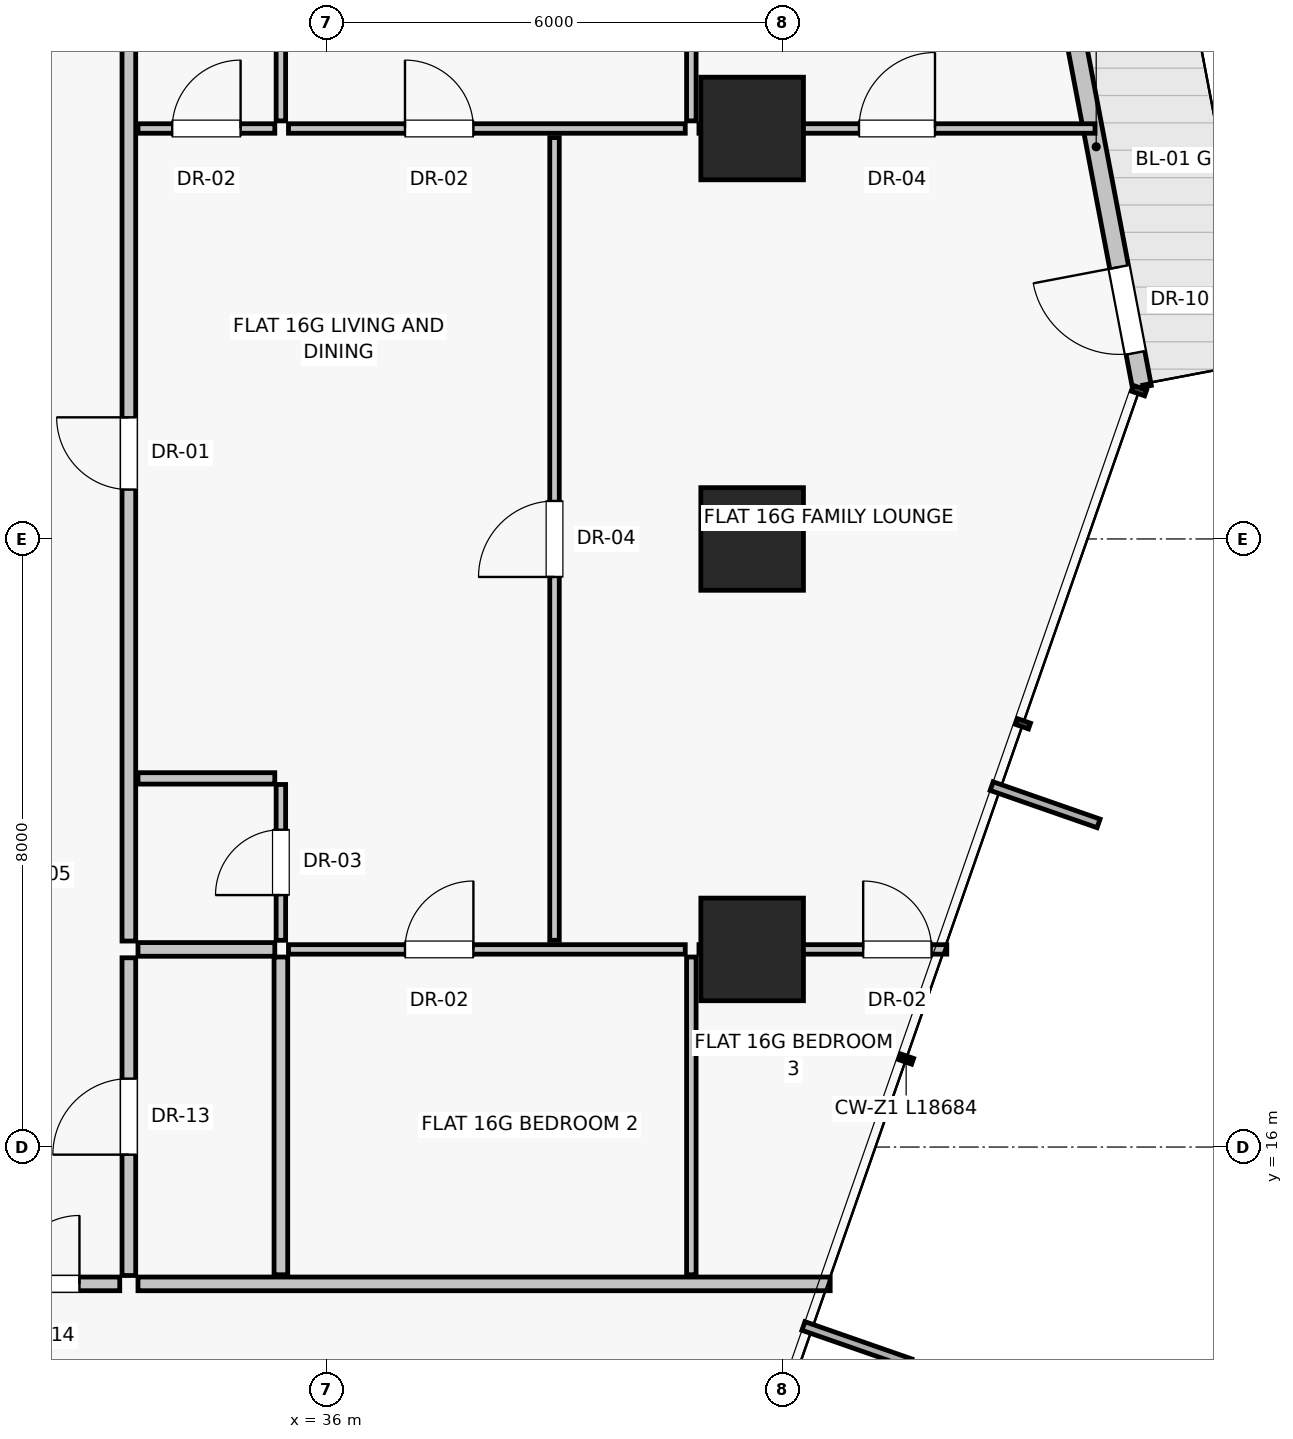
"""IFC4 building model, lengths in metres.
Left out: names, types, materials, properties, quantities, classifications, styles, units other than length and angle.
Written with IfcOpenShell. Run it as: python <this file> out.ifc"""

import sys

from ifc_helpers import new_model, si_unit, direction, frame, frame_2d, origin, origin_2d, place, context, subcontext, project, spatial, rectangle, extrude, source, transform, mapped, element, fill, save


model = new_model("IFC4")
c1 = context("Model", 3, precision=1e-05, world=origin(), true_north=direction((0.0, 1.0)))
c2 = subcontext(c1, "Body", "Model", "MODEL_VIEW")
j1 = project(units=[si_unit("LENGTHUNIT", "METRE"), si_unit("PLANEANGLEUNIT", "RADIAN")], contexts=[c1])
p1 = place(None, origin())
s1 = spatial("IfcSite", under=j1, at=p1, CompositionType="ELEMENT")
p2 = place(p1, origin())
s2 = spatial("IfcBuilding", under=s1, at=p2, CompositionType="ELEMENT")
p3 = place(p2, frame((0.0, 0.0, 60.85)))
s3 = spatial("IfcBuildingStorey", under=s2, at=p3, CompositionType="ELEMENT", Elevation=60.85)
for number, where, z_axis, x_axis in (
    (1, (41.6, 18.6, 0.0), (0.0, 0.0, 1.0), (1.0, 0.0, 0.0)),
    (2, (41.6, 24.0, 0.0), (0.0, 0.0, 1.0), (1.0, 0.0, 0.0)),
    (3, (41.6, 29.4, 0.0), (0.0, 0.0, 1.0), (1.0, 0.0, 0.0)),
):
    element("IfcColumn", number, at=place(p3, frame(where, z_axis=z_axis, x_axis=x_axis)), inside=s3, PredefinedType="COLUMN", context=c2, shape_type="SweptSolid", body=[
        extrude(rectangle(XDim=1.35, YDim=1.35, at=origin_2d()), origin(), (0.0, 0.0, 1.0), 3.25),
    ])
p4 = place(p3, frame((46.729, 25.996, 0.0), z_axis=(0.0, 0.0, 1.0), x_axis=(-0.187045972391, 0.982351161353, 0.0)))
e4 = element("IfcWall", 4, at=p4, inside=s3, PredefinedType="SOLIDWALL", context=c2, shape_type="SweptSolid", body=[
    extrude(rectangle(XDim=4.58, YDim=0.25, at=frame_2d((2.29, 0.0))), origin(), (0.0, 0.0, 1.0), 3.0),
])
p5 = place(p4, frame((0.46, 0.0, 0.0)))
e5 = element("IfcOpeningElement", 5, at=p5, cuts=e4, PredefinedType="OPENING", context=c2, shape_type="SweptSolid", body=[
    extrude(rectangle(XDim=1.15, YDim=2.25, at=frame_2d((0.575, 1.125))), frame((0.0, 0.135, 0.0), z_axis=(0.0, -1.0, 0.0), x_axis=(1.0, 0.0, 0.0)), (0.0, 0.0, 1.0), 0.27),
])
p6 = place(p3, frame((33.52, 14.2, 0.0), z_axis=(0.0, 0.0, 1.0), x_axis=(1.0, 0.0, 0.0)))
e6 = element("IfcWall", 6, at=p6, inside=s3, PredefinedType="PARTITIONING", context=c2, shape_type="SweptSolid", body=[
    extrude(rectangle(XDim=9.107, YDim=0.18, at=frame_2d((4.553, 0.0))), origin(), (0.0, 0.0, 1.0), 3.0),
])
p7 = place(p3, frame((33.4, 14.31, 0.0), z_axis=(0.0, 0.0, 1.0), x_axis=(0.0, 1.0, 0.0)))
e7 = element("IfcWall", 7, at=p7, inside=s3, PredefinedType="PARTITIONING", context=c2, shape_type="SweptSolid", body=[
    extrude(rectangle(XDim=4.18, YDim=0.18, at=frame_2d((2.09, 0.0))), origin(), (0.0, 0.0, 1.0), 3.0),
])
p8 = place(p7, frame((1.59, 0.0, 0.0)))
e8 = element("IfcOpeningElement", 8, at=p8, cuts=e7, PredefinedType="OPENING", context=c2, shape_type="SweptSolid", body=[
    extrude(rectangle(XDim=1.0, YDim=2.01, at=frame_2d((0.5, 1.005))), frame((0.0, 0.1, 0.0), z_axis=(0.0, -1.0, 0.0), x_axis=(1.0, 0.0, 0.0)), (0.0, 0.0, 1.0), 0.2),
])
p9 = place(p3, frame((33.4, 18.71, 0.0), z_axis=(0.0, 0.0, 1.0), x_axis=(0.0, 1.0, 0.0)))
e9 = element("IfcWall", 9, at=p9, inside=s3, PredefinedType="PARTITIONING", context=c2, shape_type="SweptSolid", body=[
    extrude(rectangle(XDim=14.78, YDim=0.18, at=frame_2d((7.39, 0.0))), origin(), (0.0, 0.0, 1.0), 3.0),
])
p10 = place(p9, frame((5.94, 0.0, 0.0)))
e10 = element("IfcOpeningElement", 10, at=p10, cuts=e9, PredefinedType="OPENING", context=c2, shape_type="SweptSolid", body=[
    extrude(rectangle(XDim=0.95, YDim=2.02, at=frame_2d((0.475, 1.01))), frame((0.0, 0.1, 0.0), z_axis=(0.0, -1.0, 0.0), x_axis=(1.0, 0.0, 0.0)), (0.0, 0.0, 1.0), 0.2),
])
p11 = place(p3, frame((40.8, 14.32, 0.0), z_axis=(0.0, 0.0, 1.0), x_axis=(0.0, 1.0, 0.0)))
e11 = element("IfcWall", 11, at=p11, inside=s3, PredefinedType="PARTITIONING", context=c2, shape_type="SweptSolid", body=[
    extrude(rectangle(XDim=4.18, YDim=0.125, at=frame_2d((2.09, 0.0))), origin(), (0.0, 0.0, 1.0), 3.0),
])
p12 = place(p3, frame((40.9, 18.6, 0.0), z_axis=(0.0, 0.0, 1.0), x_axis=(1.0, 0.0, 0.0)))
e12 = element("IfcWall", 12, at=p12, inside=s3, PredefinedType="PARTITIONING", context=c2, shape_type="SweptSolid", body=[
    extrude(rectangle(XDim=3.261, YDim=0.125, at=frame_2d((1.63, 0.0))), origin(), (0.0, 0.0, 1.0), 2.299),
])
p13 = place(p12, frame((2.161, 0.0, 0.0)))
e13 = element("IfcOpeningElement", 13, at=p13, cuts=e12, PredefinedType="OPENING", context=c2, shape_type="SweptSolid", body=[
    extrude(rectangle(XDim=0.9, YDim=2.01, at=frame_2d((0.45, 1.005))), frame((0.0, 0.073, 0.0), z_axis=(0.0, -1.0, 0.0), x_axis=(1.0, 0.0, 0.0)), (0.0, 0.0, 1.0), 0.145),
])
p14 = place(p3, frame((40.8, 29.5, 0.0), z_axis=(0.0, 0.0, 1.0), x_axis=(0.0, 1.0, 0.0)))
e14 = element("IfcWall", 14, at=p14, inside=s3, PredefinedType="PARTITIONING", context=c2, shape_type="SweptSolid", body=[
    extrude(rectangle(XDim=3.98, YDim=0.125, at=frame_2d((1.99, 0.0))), origin(), (0.0, 0.0, 1.0), 3.0),
])
p15 = place(p3, frame((40.9, 29.4, 0.0), z_axis=(0.0, 0.0, 1.0), x_axis=(1.0, 0.0, 0.0)))
e15 = element("IfcWall", 15, at=p15, inside=s3, PredefinedType="PARTITIONING", context=c2, shape_type="SweptSolid", body=[
    extrude(rectangle(XDim=5.211, YDim=0.125, at=frame_2d((2.605, 0.0))), origin(), (0.0, 0.0, 1.0), 2.299),
])
p16 = place(p15, frame((2.106, 0.0, 0.0)))
e16 = element("IfcOpeningElement", 16, at=p16, cuts=e15, PredefinedType="OPENING", context=c2, shape_type="SweptSolid", body=[
    extrude(rectangle(XDim=1.0, YDim=2.01, at=frame_2d((0.5, 1.005))), frame((0.0, 0.073, 0.0), z_axis=(0.0, -1.0, 0.0), x_axis=(1.0, 0.0, 0.0)), (0.0, 0.0, 1.0), 0.145),
])
p17 = place(p3, frame((39.0, 18.72, 0.0), z_axis=(0.0, 0.0, 1.0), x_axis=(0.0, 1.0, 0.0)))
e17 = element("IfcWall", 17, at=p17, inside=s3, PredefinedType="PARTITIONING", context=c2, shape_type="SweptSolid", body=[
    extrude(rectangle(XDim=10.56, YDim=0.125, at=frame_2d((5.28, 0.0))), origin(), (0.0, 0.0, 1.0), 3.0),
])
p18 = place(p17, frame((4.78, 0.0, 0.0)))
e18 = element("IfcOpeningElement", 18, at=p18, cuts=e17, PredefinedType="OPENING", context=c2, shape_type="SweptSolid", body=[
    extrude(rectangle(XDim=1.0, YDim=2.01, at=frame_2d((0.5, 1.005))), frame((0.0, 0.073, 0.0), z_axis=(0.0, -1.0, 0.0), x_axis=(1.0, 0.0, 0.0)), (0.0, 0.0, 1.0), 0.145),
])
p19 = place(p3, frame((35.4, 14.32, 0.0), z_axis=(0.0, 0.0, 1.0), x_axis=(0.0, 1.0, 0.0)))
e19 = element("IfcWall", 19, at=p19, inside=s3, PredefinedType="PARTITIONING", context=c2, shape_type="SweptSolid", body=[
    extrude(rectangle(XDim=4.18, YDim=0.18, at=frame_2d((2.09, 0.0))), origin(), (0.0, 0.0, 1.0), 3.0),
])
p20 = place(p3, frame((33.52, 18.6, 0.0), z_axis=(0.0, 0.0, 1.0), x_axis=(1.0, 0.0, 0.0)))
e20 = element("IfcWall", 20, at=p20, inside=s3, PredefinedType="PARTITIONING", context=c2, shape_type="SweptSolid", body=[
    extrude(rectangle(XDim=1.8, YDim=0.18, at=frame_2d((0.9, 0.0))), origin(), (0.0, 0.0, 1.0), 3.0),
])
p21 = place(p3, frame((35.5, 18.6, 0.0), z_axis=(0.0, 0.0, 1.0), x_axis=(1.0, 0.0, 0.0)))
e21 = element("IfcWall", 21, at=p21, inside=s3, PredefinedType="PARTITIONING", context=c2, shape_type="SweptSolid", body=[
    extrude(rectangle(XDim=5.22, YDim=0.125, at=frame_2d((2.61, 0.0))), origin(), (0.0, 0.0, 1.0), 2.299),
])
p22 = place(p21, frame((1.533, 0.0, 0.0)))
e22 = element("IfcOpeningElement", 22, at=p22, cuts=e21, PredefinedType="OPENING", context=c2, shape_type="SweptSolid", body=[
    extrude(rectangle(XDim=0.9, YDim=2.01, at=frame_2d((0.45, 1.005))), frame((0.0, 0.073, 0.0), z_axis=(0.0, -1.0, 0.0), x_axis=(1.0, 0.0, 0.0)), (0.0, 0.0, 1.0), 0.145),
])
p23 = place(p3, frame((33.52, 20.85, 0.0), z_axis=(0.0, 0.0, 1.0), x_axis=(1.0, 0.0, 0.0)))
e23 = element("IfcWall", 23, at=p23, inside=s3, PredefinedType="PARTITIONING", context=c2, shape_type="SweptSolid", body=[
    extrude(rectangle(XDim=1.8, YDim=0.15, at=frame_2d((0.9, 0.0))), origin(), (0.0, 0.0, 1.0), 3.0),
])
p24 = place(p3, frame((35.4, 18.72, 0.0), z_axis=(0.0, 0.0, 1.0), x_axis=(0.0, 1.0, 0.0)))
e24 = element("IfcWall", 24, at=p24, inside=s3, PredefinedType="PARTITIONING", context=c2, shape_type="SweptSolid", body=[
    extrude(rectangle(XDim=2.05, YDim=0.125, at=frame_2d((1.025, 0.0))), origin(), (0.0, 0.0, 1.0), 3.0),
])
p25 = place(p24, frame((0.595, 0.0, 0.0)))
e25 = element("IfcOpeningElement", 25, at=p25, cuts=e24, PredefinedType="OPENING", context=c2, shape_type="SweptSolid", body=[
    extrude(rectangle(XDim=0.86, YDim=2.01, at=frame_2d((0.43, 1.005))), frame((0.0, 0.073, 0.0), z_axis=(0.0, -1.0, 0.0), x_axis=(1.0, 0.0, 0.0)), (0.0, 0.0, 1.0), 0.145),
])
p26 = place(p3, frame((33.52, 29.4, 0.0), z_axis=(0.0, 0.0, 1.0), x_axis=(1.0, 0.0, 0.0)))
e26 = element("IfcWall", 26, at=p26, inside=s3, PredefinedType="PARTITIONING", context=c2, shape_type="SweptSolid", body=[
    extrude(rectangle(XDim=1.8, YDim=0.125, at=frame_2d((0.9, 0.0))), origin(), (0.0, 0.0, 1.0), 3.0),
])
p27 = place(p26, frame((0.45, 0.0, 0.0)))
e27 = element("IfcOpeningElement", 27, at=p27, cuts=e26, PredefinedType="OPENING", context=c2, shape_type="SweptSolid", body=[
    extrude(rectangle(XDim=0.9, YDim=2.01, at=frame_2d((0.45, 1.005))), frame((0.0, 0.073, 0.0), z_axis=(0.0, -1.0, 0.0), x_axis=(1.0, 0.0, 0.0)), (0.0, 0.0, 1.0), 0.145),
])
p28 = place(p3, frame((35.4, 29.5, 0.0), z_axis=(0.0, 0.0, 1.0), x_axis=(0.0, 1.0, 0.0)))
e28 = element("IfcWall", 28, at=p28, inside=s3, PredefinedType="PARTITIONING", context=c2, shape_type="SweptSolid", body=[
    extrude(rectangle(XDim=3.98, YDim=0.125, at=frame_2d((1.99, 0.0))), origin(), (0.0, 0.0, 1.0), 3.0),
])
p29 = place(p3, frame((35.5, 29.4, 0.0), z_axis=(0.0, 0.0, 1.0), x_axis=(1.0, 0.0, 0.0)))
e29 = element("IfcWall", 29, at=p29, inside=s3, PredefinedType="PARTITIONING", context=c2, shape_type="SweptSolid", body=[
    extrude(rectangle(XDim=5.22, YDim=0.125, at=frame_2d((2.61, 0.0))), origin(), (0.0, 0.0, 1.0), 2.299),
])
p30 = place(p29, frame((1.533, 0.0, 0.0)))
e30 = element("IfcOpeningElement", 30, at=p30, cuts=e29, PredefinedType="OPENING", context=c2, shape_type="SweptSolid", body=[
    extrude(rectangle(XDim=0.9, YDim=2.01, at=frame_2d((0.45, 1.005))), frame((0.0, 0.073, 0.0), z_axis=(0.0, -1.0, 0.0), x_axis=(1.0, 0.0, 0.0)), (0.0, 0.0, 1.0), 0.145),
])
p31 = place(p3, frame((31.32, 14.2, 0.0), z_axis=(0.0, 0.0, 1.0), x_axis=(1.0, 0.0, 0.0)))
e31 = element("IfcWall", 31, at=p31, inside=s3, PredefinedType="PARTITIONING", context=c2, shape_type="SweptSolid", body=[
    extrude(rectangle(XDim=1.96, YDim=0.18, at=frame_2d((0.98, 0.0))), origin(), (0.0, 0.0, 1.0), 3.0),
])
p32 = place(p31, frame((0.53, 0.0, 0.0)))
e32 = element("IfcOpeningElement", 32, at=p32, cuts=e31, PredefinedType="OPENING", context=c2, shape_type="SweptSolid", body=[
    extrude(rectangle(XDim=0.9, YDim=2.01, at=frame_2d((0.45, 1.005))), frame((0.0, 0.1, 0.0), z_axis=(0.0, -1.0, 0.0), x_axis=(1.0, 0.0, 0.0)), (0.0, 0.0, 1.0), 0.2),
])
m1 = source(origin(), c2, "Body", "SweptSolid", [
    extrude(rectangle(XDim=1.15, YDim=2.25, at=frame_2d((0.575, 1.125))), frame((0.0, 0.025, 0.0), z_axis=(0.0, -1.0, 0.0), x_axis=(1.0, 0.0, 0.0)), (0.0, 0.0, 1.0), 0.05),
])
p33 = place(p5, frame((1.15, 0.0, 0.0), z_axis=(0.0, 0.0, 1.0), x_axis=(-1.0, 0.0, 0.0)))
e33 = element("IfcDoor", 33, at=p33, inside=s3, OperationType="SINGLE_SWING_RIGHT", PredefinedType="DOOR", context=c2, shape_type="MappedRepresentation", body=[
    mapped(m1, transform((0.0, 0.0, 0.0), scale=1.0)),
])
fill(e5, e33)
m2 = source(origin(), c2, "Body", "SweptSolid", [
    extrude(rectangle(XDim=1.0, YDim=2.01, at=frame_2d((0.5, 1.005))), frame((0.0, 0.025, 0.0), z_axis=(0.0, -1.0, 0.0), x_axis=(1.0, 0.0, 0.0)), (0.0, 0.0, 1.0), 0.05),
])
p34 = place(p8, origin())
e34 = element("IfcDoor", 34, at=p34, inside=s3, OperationType="SINGLE_SWING_LEFT", PredefinedType="DOOR", context=c2, shape_type="MappedRepresentation", body=[
    mapped(m2, transform((0.0, 0.0, 0.0), scale=1.0)),
])
fill(e8, e34)
m3 = source(origin(), c2, "Body", "SweptSolid", [
    extrude(rectangle(XDim=0.95, YDim=2.02, at=frame_2d((0.475, 1.01))), frame((0.0, 0.025, 0.0), z_axis=(0.0, -1.0, 0.0), x_axis=(1.0, 0.0, 0.0)), (0.0, 0.0, 1.0), 0.05),
])
p35 = place(p10, origin())
e35 = element("IfcDoor", 35, at=p35, inside=s3, OperationType="SINGLE_SWING_RIGHT", PredefinedType="DOOR", context=c2, shape_type="MappedRepresentation", body=[
    mapped(m3, transform((0.0, 0.0, 0.0), scale=1.0)),
])
fill(e10, e35)
m4 = source(origin(), c2, "Body", "SweptSolid", [
    extrude(rectangle(XDim=0.9, YDim=2.01, at=frame_2d((0.45, 1.005))), frame((0.0, 0.025, 0.0), z_axis=(0.0, -1.0, 0.0), x_axis=(1.0, 0.0, 0.0)), (0.0, 0.0, 1.0), 0.05),
])
p36 = place(p13, origin())
e36 = element("IfcDoor", 36, at=p36, inside=s3, OperationType="SINGLE_SWING_LEFT", PredefinedType="DOOR", context=c2, shape_type="MappedRepresentation", body=[
    mapped(m4, transform((0.0, 0.0, 0.0), scale=1.0)),
])
fill(e13, e36)
p37 = place(p16, origin())
e37 = element("IfcDoor", 37, at=p37, inside=s3, OperationType="SINGLE_SWING_RIGHT", PredefinedType="DOOR", context=c2, shape_type="MappedRepresentation", body=[
    mapped(m2, transform((0.0, 0.0, 0.0), scale=1.0)),
])
fill(e16, e37)
p38 = place(p18, origin())
e38 = element("IfcDoor", 38, at=p38, inside=s3, OperationType="SINGLE_SWING_LEFT", PredefinedType="DOOR", context=c2, shape_type="MappedRepresentation", body=[
    mapped(m2, transform((0.0, 0.0, 0.0), scale=1.0)),
])
fill(e18, e38)
p39 = place(p22, origin())
e39 = element("IfcDoor", 39, at=p39, inside=s3, OperationType="SINGLE_SWING_RIGHT", PredefinedType="DOOR", context=c2, shape_type="MappedRepresentation", body=[
    mapped(m4, transform((0.0, 0.0, 0.0), scale=1.0)),
])
fill(e22, e39)
m5 = source(origin(), c2, "Body", "SweptSolid", [
    extrude(rectangle(XDim=0.86, YDim=2.01, at=frame_2d((0.43, 1.005))), frame((0.0, 0.025, 0.0), z_axis=(0.0, -1.0, 0.0), x_axis=(1.0, 0.0, 0.0)), (0.0, 0.0, 1.0), 0.05),
])
p40 = place(p25, origin())
e40 = element("IfcDoor", 40, at=p40, inside=s3, OperationType="SINGLE_SWING_LEFT", PredefinedType="DOOR", context=c2, shape_type="MappedRepresentation", body=[
    mapped(m5, transform((0.0, 0.0, 0.0), scale=1.0)),
])
fill(e25, e40)
p41 = place(p27, origin())
e41 = element("IfcDoor", 41, at=p41, inside=s3, OperationType="SINGLE_SWING_RIGHT", PredefinedType="DOOR", context=c2, shape_type="MappedRepresentation", body=[
    mapped(m4, transform((0.0, 0.0, 0.0), scale=1.0)),
])
fill(e27, e41)
p42 = place(p30, origin())
e42 = element("IfcDoor", 42, at=p42, inside=s3, OperationType="SINGLE_SWING_LEFT", PredefinedType="DOOR", context=c2, shape_type="MappedRepresentation", body=[
    mapped(m4, transform((0.0, 0.0, 0.0), scale=1.0)),
])
fill(e30, e42)
p43 = place(p32, origin())
e43 = element("IfcDoor", 43, at=p43, inside=s3, OperationType="SINGLE_SWING_RIGHT", PredefinedType="DOOR", context=c2, shape_type="MappedRepresentation", body=[
    mapped(m4, transform((0.0, 0.0, 0.0), scale=1.0)),
])
fill(e32, e43)
save(model, sys.argv[1])
